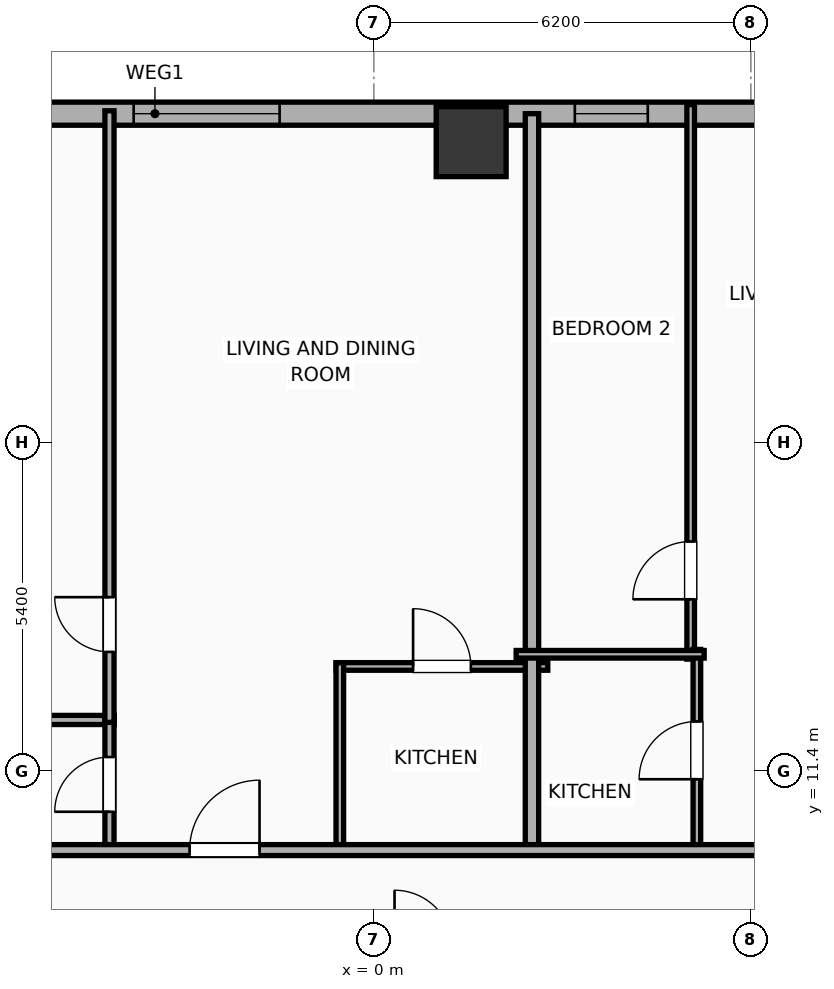
"""IFC4 building model, lengths in metres.
Left out: names, types, materials, properties, quantities, classifications, styles, units other than length and angle.
Written with IfcOpenShell. Run it as: python <this file> out.ifc"""

import sys

from ifc_helpers import new_model, si_unit, direction, frame, frame_2d, origin, origin_2d, place, context, subcontext, project, spatial, rectangle, hollow_rectangle, extrude, element, fill, save


model = new_model("IFC4")
c1 = context("Model", 3, precision=1e-05, world=origin(), true_north=direction((0.0, 1.0)))
c2 = subcontext(c1, "Body", "Model", "MODEL_VIEW")
j1 = project(units=[si_unit("LENGTHUNIT", "METRE"), si_unit("PLANEANGLEUNIT", "RADIAN")], contexts=[c1])
p1 = place(None, origin())
s1 = spatial("IfcSite", under=j1, at=p1, CompositionType="ELEMENT")
p2 = place(p1, origin())
s2 = spatial("IfcBuilding", under=s1, at=p2, CompositionType="ELEMENT")
p3 = place(p2, frame((0.0, 0.0, 37.7)))
s3 = spatial("IfcBuildingStorey", under=s2, at=p3, CompositionType="ELEMENT", Elevation=37.7)
p4 = place(p3, frame((1.6, 21.75, 0.0), z_axis=(0.0, 0.0, 1.0), x_axis=(1.0, 0.0, 0.0)))
e1 = element("IfcColumn", 1, at=p4, inside=s3, PredefinedType="COLUMN", context=c2, shape_type="SweptSolid", body=[
    extrude(hollow_rectangle(XDim=1.15, YDim=1.15, WallThickness=0.04, at=origin_2d()), origin(), (0.0, 0.0, 1.0), 3.9),
])
p5 = place(p3, frame((-29.581, 22.21, 0.0), z_axis=(0.0, 0.0, 1.0), x_axis=(1.0, 0.0, 0.0)))
e2 = element("IfcWall", 2, at=p5, inside=s3, PredefinedType="ELEMENTEDWALL", context=c2, shape_type="SweptSolid", body=[
    extrude(rectangle(XDim=51.963, YDim=0.38, at=frame_2d((25.981, 0.0))), origin(), (0.0, 0.0, 1.0), 3.65),
])
p6 = place(p5, frame((25.631, 0.0, 0.75)))
e3 = element("IfcOpeningElement", 3, at=p6, cuts=e2, PredefinedType="OPENING", context=c2, shape_type="SweptSolid", body=[
    extrude(rectangle(XDim=2.4, YDim=2.1, at=frame_2d((1.2, 1.05))), frame((0.0, 0.2, 0.0), z_axis=(0.0, -1.0, 0.0), x_axis=(1.0, 0.0, 0.0)), (0.0, 0.0, 1.0), 0.4),
])
p7 = place(p5, frame((42.952, 0.0, 0.75)))
e4 = element("IfcOpeningElement", 4, at=p7, cuts=e2, PredefinedType="OPENING", context=c2, shape_type="SweptSolid", body=[
    extrude(rectangle(XDim=2.4, YDim=2.1, at=frame_2d((1.2, 1.05))), frame((0.0, 0.2, 0.0), z_axis=(0.0, -1.0, 0.0), x_axis=(1.0, 0.0, 0.0)), (0.0, 0.0, 1.0), 0.4),
])
p8 = place(p5, frame((1.731, 0.0, 0.75)))
e5 = element("IfcOpeningElement", 5, at=p8, cuts=e2, PredefinedType="OPENING", context=c2, shape_type="SweptSolid", body=[
    extrude(rectangle(XDim=1.2, YDim=2.05, at=frame_2d((0.6, 1.025))), frame((0.0, 0.2, 0.0), z_axis=(0.0, -1.0, 0.0), x_axis=(1.0, 0.0, 0.0)), (0.0, 0.0, 1.0), 0.4),
])
p9 = place(p5, frame((5.272, 0.0, 0.75)))
e6 = element("IfcOpeningElement", 6, at=p9, cuts=e2, PredefinedType="OPENING", context=c2, shape_type="SweptSolid", body=[
    extrude(rectangle(XDim=1.2, YDim=2.05, at=frame_2d((0.6, 1.025))), frame((0.0, 0.2, 0.0), z_axis=(0.0, -1.0, 0.0), x_axis=(1.0, 0.0, 0.0)), (0.0, 0.0, 1.0), 0.4),
])
p10 = place(p5, frame((8.356, 0.0, 0.75)))
e7 = element("IfcOpeningElement", 7, at=p10, cuts=e2, PredefinedType="OPENING", context=c2, shape_type="SweptSolid", body=[
    extrude(rectangle(XDim=1.2, YDim=2.05, at=frame_2d((0.6, 1.025))), frame((0.0, 0.2, 0.0), z_axis=(0.0, -1.0, 0.0), x_axis=(1.0, 0.0, 0.0)), (0.0, 0.0, 1.0), 0.4),
])
p11 = place(p5, frame((15.632, 0.0, 0.75)))
e8 = element("IfcOpeningElement", 8, at=p11, cuts=e2, PredefinedType="OPENING", context=c2, shape_type="SweptSolid", body=[
    extrude(rectangle(XDim=1.2, YDim=2.05, at=frame_2d((0.6, 1.025))), frame((0.0, 0.2, 0.0), z_axis=(0.0, -1.0, 0.0), x_axis=(1.0, 0.0, 0.0)), (0.0, 0.0, 1.0), 0.4),
])
p12 = place(p5, frame((12.137, 0.0, 0.75)))
e9 = element("IfcOpeningElement", 9, at=p12, cuts=e2, PredefinedType="OPENING", context=c2, shape_type="SweptSolid", body=[
    extrude(rectangle(XDim=1.2, YDim=2.05, at=frame_2d((0.6, 1.025))), frame((0.0, 0.2, 0.0), z_axis=(0.0, -1.0, 0.0), x_axis=(1.0, 0.0, 0.0)), (0.0, 0.0, 1.0), 0.4),
])
p13 = place(p5, frame((18.756, 0.0, 0.75)))
e10 = element("IfcOpeningElement", 10, at=p13, cuts=e2, PredefinedType="OPENING", context=c2, shape_type="SweptSolid", body=[
    extrude(rectangle(XDim=1.2, YDim=2.05, at=frame_2d((0.6, 1.025))), frame((0.0, 0.2, 0.0), z_axis=(0.0, -1.0, 0.0), x_axis=(1.0, 0.0, 0.0)), (0.0, 0.0, 1.0), 0.4),
])
p14 = place(p5, frame((22.907, 0.0, 0.75)))
e11 = element("IfcOpeningElement", 11, at=p14, cuts=e2, PredefinedType="OPENING", context=c2, shape_type="SweptSolid", body=[
    extrude(rectangle(XDim=1.2, YDim=2.05, at=frame_2d((0.6, 1.025))), frame((0.0, 0.2, 0.0), z_axis=(0.0, -1.0, 0.0), x_axis=(1.0, 0.0, 0.0)), (0.0, 0.0, 1.0), 0.4),
])
p15 = place(p5, frame((36.381, 0.0, 0.75)))
e12 = element("IfcOpeningElement", 12, at=p15, cuts=e2, PredefinedType="OPENING", context=c2, shape_type="SweptSolid", body=[
    extrude(rectangle(XDim=1.2, YDim=2.05, at=frame_2d((0.6, 1.025))), frame((0.0, 0.2, 0.0), z_axis=(0.0, -1.0, 0.0), x_axis=(1.0, 0.0, 0.0)), (0.0, 0.0, 1.0), 0.4),
])
p16 = place(p5, frame((32.886, 0.0, 0.75)))
e13 = element("IfcOpeningElement", 13, at=p16, cuts=e2, PredefinedType="OPENING", context=c2, shape_type="SweptSolid", body=[
    extrude(rectangle(XDim=1.2, YDim=2.05, at=frame_2d((0.6, 1.025))), frame((0.0, 0.2, 0.0), z_axis=(0.0, -1.0, 0.0), x_axis=(1.0, 0.0, 0.0)), (0.0, 0.0, 1.0), 0.4),
])
p17 = place(p5, frame((39.556, 0.0, 0.75)))
e14 = element("IfcOpeningElement", 14, at=p17, cuts=e2, PredefinedType="OPENING", context=c2, shape_type="SweptSolid", body=[
    extrude(rectangle(XDim=1.2, YDim=2.05, at=frame_2d((0.6, 1.025))), frame((0.0, 0.2, 0.0), z_axis=(0.0, -1.0, 0.0), x_axis=(1.0, 0.0, 0.0)), (0.0, 0.0, 1.0), 0.4),
])
p18 = place(p5, frame((46.885, 0.0, 0.75)))
e15 = element("IfcOpeningElement", 15, at=p18, cuts=e2, PredefinedType="OPENING", context=c2, shape_type="SweptSolid", body=[
    extrude(rectangle(XDim=1.2, YDim=2.05, at=frame_2d((0.6, 1.025))), frame((0.0, 0.2, 0.0), z_axis=(0.0, -1.0, 0.0), x_axis=(1.0, 0.0, 0.0)), (0.0, 0.0, 1.0), 0.4),
])
p19 = place(p5, frame((49.531, 0.0, 0.75)))
e16 = element("IfcOpeningElement", 16, at=p19, cuts=e2, PredefinedType="OPENING", context=c2, shape_type="SweptSolid", body=[
    extrude(rectangle(XDim=1.2, YDim=2.05, at=frame_2d((0.6, 1.025))), frame((0.0, 0.2, 0.0), z_axis=(0.0, -1.0, 0.0), x_axis=(1.0, 0.0, 0.0)), (0.0, 0.0, 1.0), 0.4),
])
p20 = place(p3, frame((-8.06, 12.24, 0.0), z_axis=(0.0, 0.0, 1.0), x_axis=(1.0, 0.0, 0.0)))
e17 = element("IfcWall", 17, at=p20, inside=s3, PredefinedType="PLUMBINGWALL", context=c2, shape_type="SweptSolid", body=[
    extrude(rectangle(XDim=3.792, YDim=0.15, at=frame_2d((1.896, 0.0))), origin(), (0.0, 0.0, 1.0), 3.65),
])
p21 = place(p3, frame((-4.348, 10.08, 0.0), z_axis=(0.0, 0.0, 1.0), x_axis=(0.0, 1.0, 0.0)))
e18 = element("IfcWall", 18, at=p21, inside=s3, PredefinedType="PLUMBINGWALL", context=c2, shape_type="SweptSolid", body=[
    extrude(rectangle(XDim=2.2, YDim=0.15, at=frame_2d((1.1, 0.0))), origin(), (0.0, 0.0, 1.0), 3.65),
])
p22 = place(p21, frame((0.65, 0.0, 0.0)))
e19 = element("IfcOpeningElement", 19, at=p22, cuts=e18, PredefinedType="OPENING", context=c2, shape_type="SweptSolid", body=[
    extrude(rectangle(XDim=0.9, YDim=2.05, at=frame_2d((0.45, 1.025))), frame((0.0, 0.085, 0.0), z_axis=(0.0, -1.0, 0.0), x_axis=(1.0, 0.0, 0.0)), (0.0, 0.0, 1.0), 0.17),
])
p23 = place(p3, frame((-4.348, 12.2, 0.0), z_axis=(0.0, 0.0, 1.0), x_axis=(0.0, 1.0, 0.0)))
e20 = element("IfcWall", 20, at=p23, inside=s3, PredefinedType="PLUMBINGWALL", context=c2, shape_type="SweptSolid", body=[
    extrude(rectangle(XDim=10.058, YDim=0.15, at=frame_2d((5.029, 0.0))), origin(), (0.0, 0.0, 1.0), 3.65),
])
p24 = place(p23, frame((1.159, 0.0, 0.0)))
e21 = element("IfcOpeningElement", 21, at=p24, cuts=e20, PredefinedType="OPENING", context=c2, shape_type="SweptSolid", body=[
    extrude(rectangle(XDim=0.9, YDim=2.05, at=frame_2d((0.45, 1.025))), frame((0.0, 0.085, 0.0), z_axis=(0.0, -1.0, 0.0), x_axis=(1.0, 0.0, 0.0)), (0.0, 0.0, 1.0), 0.17),
])
p25 = place(p3, frame((-0.62, 13.12, 0.0), z_axis=(0.0, 0.0, 1.0), x_axis=(1.0, 0.0, 0.0)))
e22 = element("IfcWall", 22, at=p25, inside=s3, PredefinedType="PARTITIONING", context=c2, shape_type="SweptSolid", body=[
    extrude(rectangle(XDim=3.48, YDim=0.125, at=frame_2d((1.74, 0.0))), origin(), (0.0, 0.0, 1.0), 3.65),
])
p26 = place(p25, frame((1.265, 0.0, 0.0)))
e23 = element("IfcOpeningElement", 23, at=p26, cuts=e22, PredefinedType="OPENING", context=c2, shape_type="SweptSolid", body=[
    extrude(rectangle(XDim=0.95, YDim=2.05, at=frame_2d((0.475, 1.025))), frame((0.0, 0.073, 0.0), z_axis=(0.0, -1.0, 0.0), x_axis=(1.0, 0.0, 0.0)), (0.0, 0.0, 1.0), 0.145),
])
p27 = place(p3, frame((-0.56, 10.08, 0.0), z_axis=(0.0, 0.0, 1.0), x_axis=(0.0, 1.0, 0.0)))
e24 = element("IfcWall", 24, at=p27, inside=s3, PredefinedType="PARTITIONING", context=c2, shape_type="SweptSolid", body=[
    extrude(rectangle(XDim=3.1, YDim=0.125, at=frame_2d((1.55, 0.0))), origin(), (0.0, 0.0, 1.0), 3.65),
])
p28 = place(p3, frame((2.6, 10.02, 0.0), z_axis=(0.0, 0.0, 1.0), x_axis=(0.0, 1.0, 0.0)))
e25 = element("IfcWall", 25, at=p28, inside=s3, PredefinedType="PARTITIONING", context=c2, shape_type="SweptSolid", body=[
    extrude(rectangle(XDim=12.19, YDim=0.22, at=frame_2d((6.095, 0.0))), origin(), (0.0, 0.0, 1.0), 2.94),
])
p29 = place(p3, frame((5.21, 13.24, 0.0), z_axis=(0.0, 0.0, 1.0), x_axis=(0.0, 1.0, 0.0)))
e26 = element("IfcWall", 26, at=p29, inside=s3, PredefinedType="PARTITIONING", context=c2, shape_type="SweptSolid", body=[
    extrude(rectangle(XDim=9.12, YDim=0.125, at=frame_2d((4.56, 0.0))), origin(), (0.0, 0.0, 1.0), 3.65),
])
p30 = place(p29, frame((0.984, 0.0, 0.0)))
e27 = element("IfcOpeningElement", 27, at=p30, cuts=e26, PredefinedType="OPENING", context=c2, shape_type="SweptSolid", body=[
    extrude(rectangle(XDim=0.95, YDim=2.05, at=frame_2d((0.475, 1.025))), frame((0.0, 0.073, 0.0), z_axis=(0.0, -1.0, 0.0), x_axis=(1.0, 0.0, 0.0)), (0.0, 0.0, 1.0), 0.145),
])
p31 = place(p3, frame((5.312, 10.08, 0.0), z_axis=(0.0, 0.0, 1.0), x_axis=(0.0, 1.0, 0.0)))
e28 = element("IfcWall", 28, at=p31, inside=s3, PredefinedType="PARTITIONING", context=c2, shape_type="SweptSolid", body=[
    extrude(rectangle(XDim=3.32, YDim=0.125, at=frame_2d((1.66, 0.0))), origin(), (0.0, 0.0, 1.0), 3.65),
])
p32 = place(p31, frame((1.185, 0.0, 0.0)))
e29 = element("IfcOpeningElement", 29, at=p32, cuts=e28, PredefinedType="OPENING", context=c2, shape_type="SweptSolid", body=[
    extrude(rectangle(XDim=0.95, YDim=2.05, at=frame_2d((0.475, 1.025))), frame((0.0, 0.073, 0.0), z_axis=(0.0, -1.0, 0.0), x_axis=(1.0, 0.0, 0.0)), (0.0, 0.0, 1.0), 0.145),
])
p33 = place(p3, frame((2.34, 13.32, 0.0), z_axis=(0.0, 0.0, 1.0), x_axis=(1.0, 0.0, 0.0)))
e30 = element("IfcWall", 30, at=p33, inside=s3, PredefinedType="PARTITIONING", context=c2, shape_type="SweptSolid", body=[
    extrude(rectangle(XDim=3.092, YDim=0.125, at=frame_2d((1.546, 0.0))), origin(), (0.0, 0.0, 1.0), 3.65),
])
p34 = place(p3, frame((-33.41, 10.1, 0.0), z_axis=(0.0, 0.0, 1.0), x_axis=(1.0, 0.0, 0.0)))
e31 = element("IfcWall", 31, at=p34, inside=s3, PredefinedType="PARTITIONING", context=c2, shape_type="SweptSolid", body=[
    extrude(rectangle(XDim=59.62, YDim=0.18, at=frame_2d((29.81, 0.0))), origin(), (0.0, 0.0, 1.0), 3.65),
])
p35 = place(p34, frame((3.354, 0.0, 0.0)))
e32 = element("IfcOpeningElement", 32, at=p35, cuts=e31, PredefinedType="OPENING", context=c2, shape_type="SweptSolid", body=[
    extrude(rectangle(XDim=1.15, YDim=2.05, at=frame_2d((0.575, 1.025))), frame((0.0, 0.1, 0.0), z_axis=(0.0, -1.0, 0.0), x_axis=(1.0, 0.0, 0.0)), (0.0, 0.0, 1.0), 0.2),
])
p36 = place(p34, frame((10.997, 0.0, 0.0)))
e33 = element("IfcOpeningElement", 33, at=p36, cuts=e31, PredefinedType="OPENING", context=c2, shape_type="SweptSolid", body=[
    extrude(rectangle(XDim=1.15, YDim=2.05, at=frame_2d((0.575, 1.025))), frame((0.0, 0.1, 0.0), z_axis=(0.0, -1.0, 0.0), x_axis=(1.0, 0.0, 0.0)), (0.0, 0.0, 1.0), 0.2),
])
p37 = place(p34, frame((20.232, 0.0, 0.0)))
e34 = element("IfcOpeningElement", 34, at=p37, cuts=e31, PredefinedType="OPENING", context=c2, shape_type="SweptSolid", body=[
    extrude(rectangle(XDim=1.15, YDim=2.05, at=frame_2d((0.575, 1.025))), frame((0.0, 0.1, 0.0), z_axis=(0.0, -1.0, 0.0), x_axis=(1.0, 0.0, 0.0)), (0.0, 0.0, 1.0), 0.2),
])
p38 = place(p34, frame((30.38, 0.0, 0.0)))
e35 = element("IfcOpeningElement", 35, at=p38, cuts=e31, PredefinedType="OPENING", context=c2, shape_type="SweptSolid", body=[
    extrude(rectangle(XDim=1.15, YDim=2.05, at=frame_2d((0.575, 1.025))), frame((0.0, 0.1, 0.0), z_axis=(0.0, -1.0, 0.0), x_axis=(1.0, 0.0, 0.0)), (0.0, 0.0, 1.0), 0.2),
])
p39 = place(p34, frame((40.998, 0.0, 0.0)))
e36 = element("IfcOpeningElement", 36, at=p39, cuts=e31, PredefinedType="OPENING", context=c2, shape_type="SweptSolid", body=[
    extrude(rectangle(XDim=1.15, YDim=2.05, at=frame_2d((0.575, 1.025))), frame((0.0, 0.1, 0.0), z_axis=(0.0, -1.0, 0.0), x_axis=(1.0, 0.0, 0.0)), (0.0, 0.0, 1.0), 0.2),
])
p40 = place(p34, frame((49.428, 0.0, 0.0)))
e37 = element("IfcOpeningElement", 37, at=p40, cuts=e31, PredefinedType="OPENING", context=c2, shape_type="SweptSolid", body=[
    extrude(rectangle(XDim=0.9, YDim=2.05, at=frame_2d((0.45, 1.025))), frame((0.0, 0.1, 0.0), z_axis=(0.0, -1.0, 0.0), x_axis=(1.0, 0.0, 0.0)), (0.0, 0.0, 1.0), 0.2),
])
p41 = place(p34, frame((56.07, 0.0, 0.0)))
e38 = element("IfcOpeningElement", 38, at=p41, cuts=e31, PredefinedType="OPENING", context=c2, shape_type="SweptSolid", body=[
    extrude(rectangle(XDim=0.9, YDim=2.05, at=frame_2d((0.45, 1.025))), frame((0.0, 0.1, 0.0), z_axis=(0.0, -1.0, 0.0), x_axis=(1.0, 0.0, 0.0)), (0.0, 0.0, 1.0), 0.2),
])
p42 = place(p6, origin())
e39 = element("IfcWindow", 39, at=p42, inside=s3, PartitioningType="SINGLE_PANEL", PredefinedType="WINDOW", context=c2, shape_type="SweptSolid", body=[
    extrude(rectangle(XDim=2.4, YDim=2.1, at=frame_2d((1.2, 1.05))), frame((0.0, 0.03, 0.0), z_axis=(0.0, -1.0, 0.0), x_axis=(1.0, 0.0, 0.0)), (0.0, 0.0, 1.0), 0.06),
])
fill(e3, e39)
p43 = place(p16, origin())
e40 = element("IfcWindow", 40, at=p43, inside=s3, PartitioningType="SINGLE_PANEL", PredefinedType="WINDOW", context=c2, shape_type="SweptSolid", body=[
    extrude(rectangle(XDim=1.2, YDim=2.05, at=frame_2d((0.6, 1.025))), frame((0.0, 0.03, 0.0), z_axis=(0.0, -1.0, 0.0), x_axis=(1.0, 0.0, 0.0)), (0.0, 0.0, 1.0), 0.06),
])
fill(e13, e40)
p44 = place(p22, origin())
e41 = element("IfcDoor", 41, at=p44, inside=s3, OperationType="SINGLE_SWING_LEFT", PredefinedType="DOOR", context=c2, shape_type="SweptSolid", body=[
    extrude(rectangle(XDim=0.9, YDim=2.05, at=frame_2d((0.45, 1.025))), frame((0.0, 0.025, 0.0), z_axis=(0.0, -1.0, 0.0), x_axis=(1.0, 0.0, 0.0)), (0.0, 0.0, 1.0), 0.05),
])
fill(e19, e41)
p45 = place(p24, origin())
e42 = element("IfcDoor", 42, at=p45, inside=s3, OperationType="SINGLE_SWING_RIGHT", PredefinedType="DOOR", context=c2, shape_type="SweptSolid", body=[
    extrude(rectangle(XDim=0.9, YDim=2.05, at=frame_2d((0.45, 1.025))), frame((0.0, 0.025, 0.0), z_axis=(0.0, -1.0, 0.0), x_axis=(1.0, 0.0, 0.0)), (0.0, 0.0, 1.0), 0.05),
])
fill(e21, e42)
p46 = place(p26, origin())
e43 = element("IfcDoor", 43, at=p46, inside=s3, OperationType="SINGLE_SWING_LEFT", PredefinedType="DOOR", context=c2, shape_type="SweptSolid", body=[
    extrude(rectangle(XDim=0.95, YDim=2.05, at=frame_2d((0.475, 1.025))), frame((0.0, 0.025, 0.0), z_axis=(0.0, -1.0, 0.0), x_axis=(1.0, 0.0, 0.0)), (0.0, 0.0, 1.0), 0.05),
])
fill(e23, e43)
p47 = place(p30, origin())
e44 = element("IfcDoor", 44, at=p47, inside=s3, OperationType="SINGLE_SWING_LEFT", PredefinedType="DOOR", context=c2, shape_type="SweptSolid", body=[
    extrude(rectangle(XDim=0.95, YDim=2.05, at=frame_2d((0.475, 1.025))), frame((0.0, 0.025, 0.0), z_axis=(0.0, -1.0, 0.0), x_axis=(1.0, 0.0, 0.0)), (0.0, 0.0, 1.0), 0.05),
])
fill(e27, e44)
p48 = place(p32, origin())
e45 = element("IfcDoor", 45, at=p48, inside=s3, OperationType="SINGLE_SWING_LEFT", PredefinedType="DOOR", context=c2, shape_type="SweptSolid", body=[
    extrude(rectangle(XDim=0.95, YDim=2.05, at=frame_2d((0.475, 1.025))), frame((0.0, 0.025, 0.0), z_axis=(0.0, -1.0, 0.0), x_axis=(1.0, 0.0, 0.0)), (0.0, 0.0, 1.0), 0.05),
])
fill(e29, e45)
p49 = place(p38, origin())
e46 = element("IfcDoor", 46, at=p49, inside=s3, OperationType="SINGLE_SWING_RIGHT", PredefinedType="DOOR", context=c2, shape_type="SweptSolid", body=[
    extrude(rectangle(XDim=1.15, YDim=2.05, at=frame_2d((0.575, 1.025))), frame((0.0, 0.025, 0.0), z_axis=(0.0, -1.0, 0.0), x_axis=(1.0, 0.0, 0.0)), (0.0, 0.0, 1.0), 0.05),
])
fill(e35, e46)
save(model, sys.argv[1])
